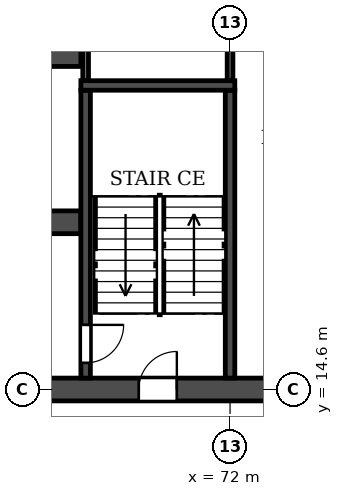
"""IFC4 building model, lengths in metres.
Left out: names, types, materials, properties, quantities, classifications, styles, units other than length and angle.
Written with IfcOpenShell. Run it as: python <this file> out.ifc"""

import sys

from ifc_helpers import new_model, si_unit, direction, frame, frame_2d, origin, place, context, subcontext, project, spatial, rectangle, extrude, element, fill, save


model = new_model("IFC4")
c1 = context("Model", 3, precision=1e-05, world=origin(), true_north=direction((0.0, 1.0)))
c2 = subcontext(c1, "Body", "Model", "MODEL_VIEW")
j1 = project(units=[si_unit("LENGTHUNIT", "METRE"), si_unit("PLANEANGLEUNIT", "RADIAN")], contexts=[c1])
p1 = place(None, origin())
s1 = spatial("IfcSite", under=j1, at=p1, CompositionType="ELEMENT")
p2 = place(p1, origin())
s2 = spatial("IfcBuilding", under=s1, at=p2, CompositionType="ELEMENT")
p3 = place(p2, frame((0.0, 0.0, 26.7)))
s3 = spatial("IfcBuildingStorey", under=s2, at=p3, CompositionType="ELEMENT", Elevation=26.7)
p4 = place(p3, frame((2.6, 14.6, 0.0), z_axis=(0.0, 0.0, 1.0), x_axis=(1.0, 0.0, 0.0)))
e1 = element("IfcWall", 1, at=p4, inside=s3, PredefinedType="SOLIDWALL", context=c2, shape_type="SweptSolid", body=[
    extrude(rectangle(XDim=96.8, YDim=0.6, at=frame_2d((48.4, 0.0))), origin(), (0.0, 0.0, 1.0), 3.05),
])
p5 = place(p4, frame((7.2, 0.0, 0.0)))
e2 = element("IfcOpeningElement", 2, at=p5, cuts=e1, PredefinedType="OPENING", context=c2, shape_type="SweptSolid", body=[
    extrude(rectangle(XDim=1.0, YDim=2.1, at=frame_2d((0.5, 1.05))), frame((0.0, 0.31, 0.0), z_axis=(0.0, -1.0, 0.0), x_axis=(1.0, 0.0, 0.0)), (0.0, 0.0, 1.0), 0.62),
])
p6 = place(p4, frame((16.3, 0.0, 0.0)))
e3 = element("IfcOpeningElement", 3, at=p6, cuts=e1, PredefinedType="OPENING", context=c2, shape_type="SweptSolid", body=[
    extrude(rectangle(XDim=1.0, YDim=2.1, at=frame_2d((0.5, 1.05))), frame((0.0, 0.31, 0.0), z_axis=(0.0, -1.0, 0.0), x_axis=(1.0, 0.0, 0.0)), (0.0, 0.0, 1.0), 0.62),
])
p7 = place(p4, frame((24.2, 0.0, 0.0)))
e4 = element("IfcOpeningElement", 4, at=p7, cuts=e1, PredefinedType="OPENING", context=c2, shape_type="SweptSolid", body=[
    extrude(rectangle(XDim=1.0, YDim=2.1, at=frame_2d((0.5, 1.05))), frame((0.0, 0.31, 0.0), z_axis=(0.0, -1.0, 0.0), x_axis=(1.0, 0.0, 0.0)), (0.0, 0.0, 1.0), 0.62),
])
p8 = place(p4, frame((28.8, 0.0, 0.0)))
e5 = element("IfcOpeningElement", 5, at=p8, cuts=e1, PredefinedType="OPENING", context=c2, shape_type="SweptSolid", body=[
    extrude(rectangle(XDim=1.0, YDim=2.1, at=frame_2d((0.5, 1.05))), frame((0.0, 0.31, 0.0), z_axis=(0.0, -1.0, 0.0), x_axis=(1.0, 0.0, 0.0)), (0.0, 0.0, 1.0), 0.62),
])
p9 = place(p4, frame((40.1, 0.0, 0.0)))
e6 = element("IfcOpeningElement", 6, at=p9, cuts=e1, PredefinedType="OPENING", context=c2, shape_type="SweptSolid", body=[
    extrude(rectangle(XDim=1.0, YDim=2.1, at=frame_2d((0.5, 1.05))), frame((0.0, 0.31, 0.0), z_axis=(0.0, -1.0, 0.0), x_axis=(1.0, 0.0, 0.0)), (0.0, 0.0, 1.0), 0.62),
])
p10 = place(p4, frame((44.0, 0.0, 0.0)))
e7 = element("IfcOpeningElement", 7, at=p10, cuts=e1, PredefinedType="OPENING", context=c2, shape_type="SweptSolid", body=[
    extrude(rectangle(XDim=1.0, YDim=2.1, at=frame_2d((0.5, 1.05))), frame((0.0, 0.31, 0.0), z_axis=(0.0, -1.0, 0.0), x_axis=(1.0, 0.0, 0.0)), (0.0, 0.0, 1.0), 0.62),
])
p11 = place(p4, frame((47.9, 0.0, 0.0)))
e8 = element("IfcOpeningElement", 8, at=p11, cuts=e1, PredefinedType="OPENING", context=c2, shape_type="SweptSolid", body=[
    extrude(rectangle(XDim=1.0, YDim=2.1, at=frame_2d((0.5, 1.05))), frame((0.0, 0.31, 0.0), z_axis=(0.0, -1.0, 0.0), x_axis=(1.0, 0.0, 0.0)), (0.0, 0.0, 1.0), 0.62),
])
p12 = place(p4, frame((53.1, 0.0, 0.0)))
e9 = element("IfcOpeningElement", 9, at=p12, cuts=e1, PredefinedType="OPENING", context=c2, shape_type="SweptSolid", body=[
    extrude(rectangle(XDim=1.0, YDim=2.1, at=frame_2d((0.5, 1.05))), frame((0.0, 0.31, 0.0), z_axis=(0.0, -1.0, 0.0), x_axis=(1.0, 0.0, 0.0)), (0.0, 0.0, 1.0), 0.62),
])
p13 = place(p4, frame((67.0, 0.0, 0.0)))
e10 = element("IfcOpeningElement", 10, at=p13, cuts=e1, PredefinedType="OPENING", context=c2, shape_type="SweptSolid", body=[
    extrude(rectangle(XDim=1.0, YDim=2.1, at=frame_2d((0.5, 1.05))), frame((0.0, 0.31, 0.0), z_axis=(0.0, -1.0, 0.0), x_axis=(1.0, 0.0, 0.0)), (0.0, 0.0, 1.0), 0.62),
])
p14 = place(p4, frame((71.6, 0.0, 0.0)))
e11 = element("IfcOpeningElement", 11, at=p14, cuts=e1, PredefinedType="OPENING", context=c2, shape_type="SweptSolid", body=[
    extrude(rectangle(XDim=1.0, YDim=2.1, at=frame_2d((0.5, 1.05))), frame((0.0, 0.31, 0.0), z_axis=(0.0, -1.0, 0.0), x_axis=(1.0, 0.0, 0.0)), (0.0, 0.0, 1.0), 0.62),
])
p15 = place(p4, frame((79.5, 0.0, 0.0)))
e12 = element("IfcOpeningElement", 12, at=p15, cuts=e1, PredefinedType="OPENING", context=c2, shape_type="SweptSolid", body=[
    extrude(rectangle(XDim=1.0, YDim=2.1, at=frame_2d((0.5, 1.05))), frame((0.0, 0.31, 0.0), z_axis=(0.0, -1.0, 0.0), x_axis=(1.0, 0.0, 0.0)), (0.0, 0.0, 1.0), 0.62),
])
p16 = place(p4, frame((83.15, 0.0, 0.0)))
e13 = element("IfcOpeningElement", 13, at=p16, cuts=e1, PredefinedType="OPENING", context=c2, shape_type="SweptSolid", body=[
    extrude(rectangle(XDim=1.0, YDim=2.1, at=frame_2d((0.5, 1.05))), frame((0.0, 0.31, 0.0), z_axis=(0.0, -1.0, 0.0), x_axis=(1.0, 0.0, 0.0)), (0.0, 0.0, 1.0), 0.62),
])
p17 = place(p4, frame((90.85, 0.0, 0.0)))
e14 = element("IfcOpeningElement", 14, at=p17, cuts=e1, PredefinedType="OPENING", context=c2, shape_type="SweptSolid", body=[
    extrude(rectangle(XDim=1.0, YDim=2.1, at=frame_2d((0.5, 1.05))), frame((0.0, 0.31, 0.0), z_axis=(0.0, -1.0, 0.0), x_axis=(1.0, 0.0, 0.0)), (0.0, 0.0, 1.0), 0.62),
])
p18 = place(p3, frame((33.925, 19.0, 0.0), z_axis=(0.0, 0.0, 1.0), x_axis=(1.0, 0.0, 0.0)))
e15 = element("IfcWall", 15, at=p18, inside=s3, PredefinedType="SOLIDWALL", context=c2, shape_type="SweptSolid", body=[
    extrude(rectangle(XDim=34.15, YDim=0.6, at=frame_2d((17.075, 0.0))), origin(), (0.0, 0.0, 1.0), 3.05),
])
p19 = place(p18, frame((16.175, 0.0, 0.0)))
e16 = element("IfcOpeningElement", 16, at=p19, cuts=e15, PredefinedType="OPENING", context=c2, shape_type="SweptSolid", body=[
    extrude(rectangle(XDim=1.8, YDim=2.1, at=frame_2d((0.9, 1.05))), frame((0.0, 0.31, 0.0), z_axis=(0.0, -1.0, 0.0), x_axis=(1.0, 0.0, 0.0)), (0.0, 0.0, 1.0), 0.62),
])
p20 = place(p18, frame((1.525, 0.0, 0.0)))
e17 = element("IfcOpeningElement", 17, at=p20, cuts=e15, PredefinedType="OPENING", context=c2, shape_type="SweptSolid", body=[
    extrude(rectangle(XDim=1.8, YDim=2.1, at=frame_2d((0.9, 1.05))), frame((0.0, 0.31, 0.0), z_axis=(0.0, -1.0, 0.0), x_axis=(1.0, 0.0, 0.0)), (0.0, 0.0, 1.0), 0.62),
])
p21 = place(p18, frame((8.725, 0.0, 0.0)))
e18 = element("IfcOpeningElement", 18, at=p21, cuts=e15, PredefinedType="OPENING", context=c2, shape_type="SweptSolid", body=[
    extrude(rectangle(XDim=1.1, YDim=2.1, at=frame_2d((0.55, 1.05))), frame((0.0, 0.31, 0.0), z_axis=(0.0, -1.0, 0.0), x_axis=(1.0, 0.0, 0.0)), (0.0, 0.0, 1.0), 0.62),
])
p22 = place(p18, frame((11.325, 0.0, 0.0)))
e19 = element("IfcOpeningElement", 19, at=p22, cuts=e15, PredefinedType="OPENING", context=c2, shape_type="SweptSolid", body=[
    extrude(rectangle(XDim=1.1, YDim=2.1, at=frame_2d((0.55, 1.05))), frame((0.0, 0.31, 0.0), z_axis=(0.0, -1.0, 0.0), x_axis=(1.0, 0.0, 0.0)), (0.0, 0.0, 1.0), 0.62),
])
p23 = place(p18, frame((13.925, 0.0, 0.0)))
e20 = element("IfcOpeningElement", 20, at=p23, cuts=e15, PredefinedType="OPENING", context=c2, shape_type="SweptSolid", body=[
    extrude(rectangle(XDim=1.1, YDim=2.1, at=frame_2d((0.55, 1.05))), frame((0.0, 0.31, 0.0), z_axis=(0.0, -1.0, 0.0), x_axis=(1.0, 0.0, 0.0)), (0.0, 0.0, 1.0), 0.62),
])
p24 = place(p18, frame((19.125, 0.0, 0.0)))
e21 = element("IfcOpeningElement", 21, at=p24, cuts=e15, PredefinedType="OPENING", context=c2, shape_type="SweptSolid", body=[
    extrude(rectangle(XDim=1.1, YDim=2.1, at=frame_2d((0.55, 1.05))), frame((0.0, 0.31, 0.0), z_axis=(0.0, -1.0, 0.0), x_axis=(1.0, 0.0, 0.0)), (0.0, 0.0, 1.0), 0.62),
])
p25 = place(p18, frame((21.725, 0.0, 0.0)))
e22 = element("IfcOpeningElement", 22, at=p25, cuts=e15, PredefinedType="OPENING", context=c2, shape_type="SweptSolid", body=[
    extrude(rectangle(XDim=1.1, YDim=2.1, at=frame_2d((0.55, 1.05))), frame((0.0, 0.31, 0.0), z_axis=(0.0, -1.0, 0.0), x_axis=(1.0, 0.0, 0.0)), (0.0, 0.0, 1.0), 0.62),
])
p26 = place(p18, frame((24.325, 0.0, 0.0)))
e23 = element("IfcOpeningElement", 23, at=p26, cuts=e15, PredefinedType="OPENING", context=c2, shape_type="SweptSolid", body=[
    extrude(rectangle(XDim=1.1, YDim=2.1, at=frame_2d((0.55, 1.05))), frame((0.0, 0.31, 0.0), z_axis=(0.0, -1.0, 0.0), x_axis=(1.0, 0.0, 0.0)), (0.0, 0.0, 1.0), 0.62),
])
p27 = place(p18, frame((30.825, 0.0, 0.0)))
e24 = element("IfcOpeningElement", 24, at=p27, cuts=e15, PredefinedType="OPENING", context=c2, shape_type="SweptSolid", body=[
    extrude(rectangle(XDim=1.8, YDim=2.1, at=frame_2d((0.9, 1.05))), frame((0.0, 0.31, 0.0), z_axis=(0.0, -1.0, 0.0), x_axis=(1.0, 0.0, 0.0)), (0.0, 0.0, 1.0), 0.62),
])
p28 = place(p3, frame((33.925, 23.4, 0.0), z_axis=(0.0, 0.0, 1.0), x_axis=(1.0, 0.0, 0.0)))
e25 = element("IfcWall", 25, at=p28, inside=s3, PredefinedType="SOLIDWALL", context=c2, shape_type="SweptSolid", body=[
    extrude(rectangle(XDim=34.15, YDim=0.6, at=frame_2d((17.075, 0.0))), origin(), (0.0, 0.0, 1.0), 3.05),
])
p29 = place(p28, frame((16.175, 0.0, 0.0)))
e26 = element("IfcOpeningElement", 26, at=p29, cuts=e25, PredefinedType="OPENING", context=c2, shape_type="SweptSolid", body=[
    extrude(rectangle(XDim=1.8, YDim=2.1, at=frame_2d((0.9, 1.05))), frame((0.0, 0.31, 0.0), z_axis=(0.0, -1.0, 0.0), x_axis=(1.0, 0.0, 0.0)), (0.0, 0.0, 1.0), 0.62),
])
p30 = place(p28, frame((11.025, 0.0, 0.0)))
e27 = element("IfcOpeningElement", 27, at=p30, cuts=e25, PredefinedType="OPENING", context=c2, shape_type="SweptSolid", body=[
    extrude(rectangle(XDim=1.1, YDim=2.1, at=frame_2d((0.55, 1.05))), frame((0.0, 0.31, 0.0), z_axis=(0.0, -1.0, 0.0), x_axis=(1.0, 0.0, 0.0)), (0.0, 0.0, 1.0), 0.62),
])
p31 = place(p3, frame((68.2, 14.9, 0.0), z_axis=(0.0, 0.0, 1.0), x_axis=(0.0, 1.0, 0.0)))
e28 = element("IfcWall", 28, at=p31, inside=s3, PredefinedType="SOLIDWALL", context=c2, shape_type="SweptSolid", body=[
    extrude(rectangle(XDim=7.575, YDim=0.25, at=frame_2d((3.788, 0.0))), origin(), (0.0, 0.0, 1.0), 3.05),
])
p32 = place(p31, frame((0.4, 0.0, 0.0)))
e29 = element("IfcOpeningElement", 29, at=p32, cuts=e28, PredefinedType="OPENING", context=c2, shape_type="SweptSolid", body=[
    extrude(rectangle(XDim=1.0, YDim=2.1, at=frame_2d((0.5, 1.05))), frame((0.0, 0.135, 0.0), z_axis=(0.0, -1.0, 0.0), x_axis=(1.0, 0.0, 0.0)), (0.0, 0.0, 1.0), 0.27),
])
p33 = place(p3, frame((72.0, 14.9, 0.0), z_axis=(0.0, 0.0, 1.0), x_axis=(0.0, 1.0, 0.0)))
e30 = element("IfcWall", 30, at=p33, inside=s3, PredefinedType="SOLIDWALL", context=c2, shape_type="SweptSolid", body=[
    extrude(rectangle(XDim=7.575, YDim=0.25, at=frame_2d((3.788, 0.0))), origin(), (0.0, 0.0, 1.0), 3.05),
])
p34 = place(p3, frame((68.075, 22.6, 0.0), z_axis=(0.0, 0.0, 1.0), x_axis=(1.0, 0.0, 0.0)))
e31 = element("IfcWall", 31, at=p34, inside=s3, PredefinedType="SOLIDWALL", context=c2, shape_type="SweptSolid", body=[
    extrude(rectangle(XDim=4.05, YDim=0.25, at=frame_2d((2.025, 0.0))), origin(), (0.0, 0.0, 1.0), 3.05),
])
for number, where, z_axis, x_axis in (
    (32, (68.2, 22.735, 0.0), (0.0, 0.0, 1.0), (0.0, 1.0, 0.0)),
    (33, (72.0, 22.735, 0.0), (0.0, 0.0, 1.0), (0.0, 1.0, 0.0)),
):
    element("IfcWall", number, at=place(p3, frame(where, z_axis=z_axis, x_axis=x_axis)), inside=s3, PredefinedType="PARTITIONING", context=c2, shape_type="SweptSolid", body=[
        extrude(rectangle(XDim=4.755, YDim=0.15, at=frame_2d((2.377, 0.0))), origin(), (0.0, 0.0, 1.0), 3.05),
    ])
p35 = place(p13, origin())
e34 = element("IfcDoor", 34, at=p35, inside=s3, OperationType="SINGLE_SWING_RIGHT", PredefinedType="DOOR", context=c2, shape_type="SweptSolid", body=[
    extrude(rectangle(XDim=1.0, YDim=2.1, at=frame_2d((0.5, 1.05))), frame((0.0, 0.025, 0.0), z_axis=(0.0, -1.0, 0.0), x_axis=(1.0, 0.0, 0.0)), (0.0, 0.0, 1.0), 0.05),
])
fill(e10, e34)
p36 = place(p32, frame((1.0, 0.0, 0.0), z_axis=(0.0, 0.0, 1.0), x_axis=(-1.0, 0.0, 0.0)))
e35 = element("IfcDoor", 35, at=p36, inside=s3, OperationType="SINGLE_SWING_LEFT", PredefinedType="DOOR", context=c2, shape_type="SweptSolid", body=[
    extrude(rectangle(XDim=1.0, YDim=2.1, at=frame_2d((0.5, 1.05))), frame((0.0, 0.025, 0.0), z_axis=(0.0, -1.0, 0.0), x_axis=(1.0, 0.0, 0.0)), (0.0, 0.0, 1.0), 0.05),
])
fill(e29, e35)
save(model, sys.argv[1])
